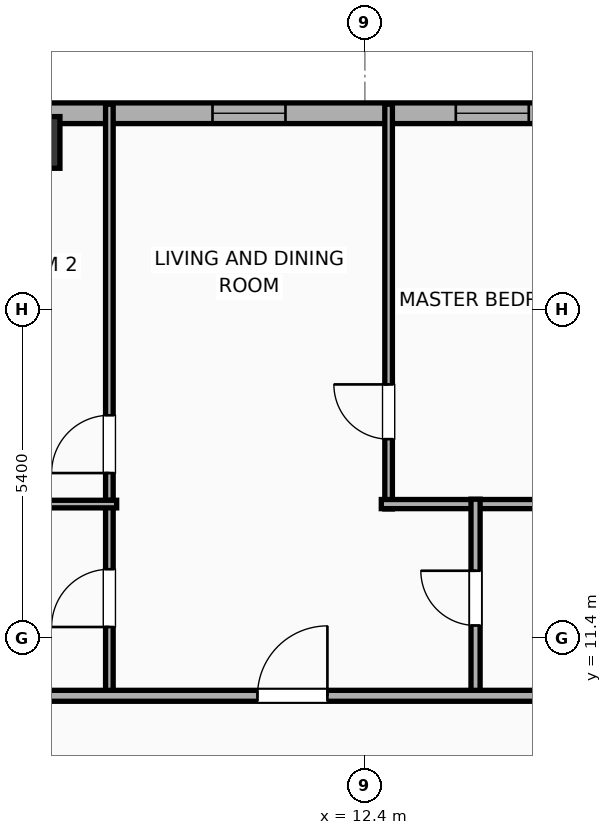
"""IFC4 building model, lengths in metres.
Left out: names, types, materials, properties, quantities, classifications, styles, units other than length and angle.
Written with IfcOpenShell. Run it as: python <this file> out.ifc"""

import sys

from ifc_helpers import new_model, si_unit, direction, frame, frame_2d, origin, origin_2d, place, context, subcontext, project, spatial, rectangle, hollow_rectangle, extrude, element, fill, save


model = new_model("IFC4")
c1 = context("Model", 3, precision=1e-05, world=origin(), true_north=direction((0.0, 1.0)))
c2 = subcontext(c1, "Body", "Model", "MODEL_VIEW")
j1 = project(units=[si_unit("LENGTHUNIT", "METRE"), si_unit("PLANEANGLEUNIT", "RADIAN")], contexts=[c1])
p1 = place(None, origin())
s1 = spatial("IfcSite", under=j1, at=p1, CompositionType="ELEMENT")
p2 = place(p1, origin())
s2 = spatial("IfcBuilding", under=s1, at=p2, CompositionType="ELEMENT")
p3 = place(p2, frame((0.0, 0.0, 204.1)))
s3 = spatial("IfcBuildingStorey", under=s2, at=p3, CompositionType="ELEMENT", Elevation=204.1)
p4 = place(p3, frame((6.96, 19.55, 0.0), z_axis=(0.0, 0.0, 1.0), x_axis=(1.0, 0.0, 0.0)))
e1 = element("IfcColumn", 1, at=p4, inside=s3, PredefinedType="COLUMN", context=c2, shape_type="SweptSolid", body=[
    extrude(hollow_rectangle(XDim=0.85, YDim=0.85, WallThickness=0.028, at=origin_2d()), origin(), (0.0, 0.0, 1.0), 3.9),
])
p5 = place(p3, frame((-22.783, 20.03, 0.0), z_axis=(0.0, 0.0, 1.0), x_axis=(1.0, 0.0, 0.0)))
e2 = element("IfcWall", 2, at=p5, inside=s3, PredefinedType="ELEMENTEDWALL", context=c2, shape_type="SweptSolid", body=[
    extrude(rectangle(XDim=49.566, YDim=0.34, at=frame_2d((24.783, 0.0))), origin(), (0.0, 0.0, 1.0), 3.65),
])
p6 = place(p5, frame((6.211, 0.0, 0.75)))
e3 = element("IfcOpeningElement", 3, at=p6, cuts=e2, PredefinedType="OPENING", context=c2, shape_type="SweptSolid", body=[
    extrude(rectangle(XDim=2.4, YDim=2.1, at=frame_2d((1.2, 1.05))), frame((0.0, 0.18, 0.0), z_axis=(0.0, -1.0, 0.0), x_axis=(1.0, 0.0, 0.0)), (0.0, 0.0, 1.0), 0.36),
])
p7 = place(p5, frame((22.733, 0.0, 0.75)))
e4 = element("IfcOpeningElement", 4, at=p7, cuts=e2, PredefinedType="OPENING", context=c2, shape_type="SweptSolid", body=[
    extrude(rectangle(XDim=2.4, YDim=2.1, at=frame_2d((1.2, 1.05))), frame((0.0, 0.18, 0.0), z_axis=(0.0, -1.0, 0.0), x_axis=(1.0, 0.0, 0.0)), (0.0, 0.0, 1.0), 0.36),
])
p8 = place(p5, frame((1.132, 0.0, 0.75)))
e5 = element("IfcOpeningElement", 5, at=p8, cuts=e2, PredefinedType="OPENING", context=c2, shape_type="SweptSolid", body=[
    extrude(rectangle(XDim=1.2, YDim=2.05, at=frame_2d((0.6, 1.025))), frame((0.0, 0.18, 0.0), z_axis=(0.0, -1.0, 0.0), x_axis=(1.0, 0.0, 0.0)), (0.0, 0.0, 1.0), 0.36),
])
p9 = place(p5, frame((3.678, 0.0, 0.75)))
e6 = element("IfcOpeningElement", 6, at=p9, cuts=e2, PredefinedType="OPENING", context=c2, shape_type="SweptSolid", body=[
    extrude(rectangle(XDim=1.2, YDim=2.05, at=frame_2d((0.6, 1.025))), frame((0.0, 0.18, 0.0), z_axis=(0.0, -1.0, 0.0), x_axis=(1.0, 0.0, 0.0)), (0.0, 0.0, 1.0), 0.36),
])
p10 = place(p5, frame((14.804, 0.0, 0.75)))
e7 = element("IfcOpeningElement", 7, at=p10, cuts=e2, PredefinedType="OPENING", context=c2, shape_type="SweptSolid", body=[
    extrude(rectangle(XDim=1.2, YDim=2.05, at=frame_2d((0.6, 1.025))), frame((0.0, 0.18, 0.0), z_axis=(0.0, -1.0, 0.0), x_axis=(1.0, 0.0, 0.0)), (0.0, 0.0, 1.0), 0.36),
])
p11 = place(p5, frame((12.054, 0.0, 0.75)))
e8 = element("IfcOpeningElement", 8, at=p11, cuts=e2, PredefinedType="OPENING", context=c2, shape_type="SweptSolid", body=[
    extrude(rectangle(XDim=1.2, YDim=2.05, at=frame_2d((0.6, 1.025))), frame((0.0, 0.18, 0.0), z_axis=(0.0, -1.0, 0.0), x_axis=(1.0, 0.0, 0.0)), (0.0, 0.0, 1.0), 0.36),
])
p12 = place(p5, frame((17.933, 0.0, 0.75)))
e9 = element("IfcOpeningElement", 9, at=p12, cuts=e2, PredefinedType="OPENING", context=c2, shape_type="SweptSolid", body=[
    extrude(rectangle(XDim=1.2, YDim=2.05, at=frame_2d((0.6, 1.025))), frame((0.0, 0.18, 0.0), z_axis=(0.0, -1.0, 0.0), x_axis=(1.0, 0.0, 0.0)), (0.0, 0.0, 1.0), 0.36),
])
p13 = place(p5, frame((26.278, 0.0, 0.75)))
e10 = element("IfcOpeningElement", 10, at=p13, cuts=e2, PredefinedType="OPENING", context=c2, shape_type="SweptSolid", body=[
    extrude(rectangle(XDim=1.2, YDim=2.05, at=frame_2d((0.6, 1.025))), frame((0.0, 0.18, 0.0), z_axis=(0.0, -1.0, 0.0), x_axis=(1.0, 0.0, 0.0)), (0.0, 0.0, 1.0), 0.36),
])
p14 = place(p5, frame((32.677, 0.0, 0.75)))
e11 = element("IfcOpeningElement", 11, at=p14, cuts=e2, PredefinedType="OPENING", context=c2, shape_type="SweptSolid", body=[
    extrude(rectangle(XDim=1.2, YDim=2.05, at=frame_2d((0.6, 1.025))), frame((0.0, 0.18, 0.0), z_axis=(0.0, -1.0, 0.0), x_axis=(1.0, 0.0, 0.0)), (0.0, 0.0, 1.0), 0.36),
])
p15 = place(p5, frame((28.217, 0.0, 0.75)))
e12 = element("IfcOpeningElement", 12, at=p15, cuts=e2, PredefinedType="OPENING", context=c2, shape_type="SweptSolid", body=[
    extrude(rectangle(XDim=0.85, YDim=2.05, at=frame_2d((0.425, 1.025))), frame((0.0, 0.18, 0.0), z_axis=(0.0, -1.0, 0.0), x_axis=(1.0, 0.0, 0.0)), (0.0, 0.0, 1.0), 0.36),
])
p16 = place(p5, frame((36.678, 0.0, 0.75)))
e13 = element("IfcOpeningElement", 13, at=p16, cuts=e2, PredefinedType="OPENING", context=c2, shape_type="SweptSolid", body=[
    extrude(rectangle(XDim=1.2, YDim=2.05, at=frame_2d((0.6, 1.025))), frame((0.0, 0.18, 0.0), z_axis=(0.0, -1.0, 0.0), x_axis=(1.0, 0.0, 0.0)), (0.0, 0.0, 1.0), 0.36),
])
p17 = place(p5, frame((40.307, 0.0, 0.75)))
e14 = element("IfcOpeningElement", 14, at=p17, cuts=e2, PredefinedType="OPENING", context=c2, shape_type="SweptSolid", body=[
    extrude(rectangle(XDim=1.2, YDim=2.05, at=frame_2d((0.6, 1.025))), frame((0.0, 0.18, 0.0), z_axis=(0.0, -1.0, 0.0), x_axis=(1.0, 0.0, 0.0)), (0.0, 0.0, 1.0), 0.36),
])
p18 = place(p5, frame((43.696, 0.0, 0.75)))
e15 = element("IfcOpeningElement", 15, at=p18, cuts=e2, PredefinedType="OPENING", context=c2, shape_type="SweptSolid", body=[
    extrude(rectangle(XDim=1.2, YDim=2.05, at=frame_2d((0.6, 1.025))), frame((0.0, 0.18, 0.0), z_axis=(0.0, -1.0, 0.0), x_axis=(1.0, 0.0, 0.0)), (0.0, 0.0, 1.0), 0.36),
])
p19 = place(p5, frame((46.739, 0.0, 0.75)))
e16 = element("IfcOpeningElement", 16, at=p19, cuts=e2, PredefinedType="OPENING", context=c2, shape_type="SweptSolid", body=[
    extrude(rectangle(XDim=1.2, YDim=2.05, at=frame_2d((0.6, 1.025))), frame((0.0, 0.18, 0.0), z_axis=(0.0, -1.0, 0.0), x_axis=(1.0, 0.0, 0.0)), (0.0, 0.0, 1.0), 0.36),
])
p20 = place(p3, frame((8.198, 13.541, 0.0), z_axis=(0.0, 0.0, 1.0), x_axis=(0.0, 1.0, 0.0)))
e17 = element("IfcWall", 17, at=p20, inside=s3, PredefinedType="PARTITIONING", context=c2, shape_type="SweptSolid", body=[
    extrude(rectangle(XDim=6.639, YDim=0.125, at=frame_2d((3.32, 0.0))), origin(), (0.0, 0.0, 1.0), 3.65),
])
p21 = place(p20, frame((0.573, 0.0, 0.0)))
e18 = element("IfcOpeningElement", 18, at=p21, cuts=e17, PredefinedType="OPENING", context=c2, shape_type="SweptSolid", body=[
    extrude(rectangle(XDim=0.95, YDim=2.05, at=frame_2d((0.475, 1.025))), frame((0.0, 0.073, 0.0), z_axis=(0.0, -1.0, 0.0), x_axis=(1.0, 0.0, 0.0)), (0.0, 0.0, 1.0), 0.145),
])
p22 = place(p3, frame((12.79, 13.523, 0.0), z_axis=(0.0, 0.0, 1.0), x_axis=(0.0, 1.0, 0.0)))
e19 = element("IfcWall", 19, at=p22, inside=s3, PredefinedType="PARTITIONING", context=c2, shape_type="SweptSolid", body=[
    extrude(rectangle(XDim=6.657, YDim=0.125, at=frame_2d((3.329, 0.0))), origin(), (0.0, 0.0, 1.0), 3.65),
])
p23 = place(p22, frame((1.148, 0.0, 0.0)))
e20 = element("IfcOpeningElement", 20, at=p23, cuts=e19, PredefinedType="OPENING", context=c2, shape_type="SweptSolid", body=[
    extrude(rectangle(XDim=0.9, YDim=2.05, at=frame_2d((0.45, 1.025))), frame((0.0, 0.073, 0.0), z_axis=(0.0, -1.0, 0.0), x_axis=(1.0, 0.0, 0.0)), (0.0, 0.0, 1.0), 0.145),
])
p24 = place(p3, frame((12.67, 13.603, 0.0), z_axis=(0.0, 0.0, 1.0), x_axis=(1.0, 0.0, 0.0)))
e21 = element("IfcWall", 21, at=p24, inside=s3, PredefinedType="PLUMBINGWALL", context=c2, shape_type="SweptSolid", body=[
    extrude(rectangle(XDim=3.79, YDim=0.15, at=frame_2d((1.895, 0.0))), origin(), (0.0, 0.0, 1.0), 3.65),
])
p25 = place(p3, frame((8.198, 10.43, 0.0), z_axis=(0.0, 0.0, 1.0), x_axis=(0.0, 1.0, 0.0)))
e22 = element("IfcWall", 22, at=p25, inside=s3, PredefinedType="PARTITIONING", context=c2, shape_type="SweptSolid", body=[
    extrude(rectangle(XDim=3.236, YDim=0.125, at=frame_2d((1.618, 0.0))), origin(), (0.0, 0.0, 1.0), 3.65),
])
p26 = place(p25, frame((1.152, 0.0, 0.0)))
e23 = element("IfcOpeningElement", 23, at=p26, cuts=e22, PredefinedType="OPENING", context=c2, shape_type="SweptSolid", body=[
    extrude(rectangle(XDim=0.95, YDim=2.05, at=frame_2d((0.475, 1.025))), frame((0.0, 0.073, 0.0), z_axis=(0.0, -1.0, 0.0), x_axis=(1.0, 0.0, 0.0)), (0.0, 0.0, 1.0), 0.145),
])
p27 = place(p3, frame((4.94, 13.603, 0.0), z_axis=(0.0, 0.0, 1.0), x_axis=(1.0, 0.0, 0.0)))
e24 = element("IfcWall", 24, at=p27, inside=s3, PredefinedType="PARTITIONING", context=c2, shape_type="SweptSolid", body=[
    extrude(rectangle(XDim=3.378, YDim=0.125, at=frame_2d((1.689, 0.0))), origin(), (0.0, 0.0, 1.0), 3.65),
])
p28 = place(p3, frame((14.22, 10.43, 0.0), z_axis=(0.0, 0.0, 1.0), x_axis=(0.0, 1.0, 0.0)))
e25 = element("IfcWall", 25, at=p28, inside=s3, PredefinedType="PLUMBINGWALL", context=c2, shape_type="SweptSolid", body=[
    extrude(rectangle(XDim=3.253, YDim=0.15, at=frame_2d((1.626, 0.0))), origin(), (0.0, 0.0, 1.0), 3.65),
])
p29 = place(p28, frame((1.177, 0.0, 0.0)))
e26 = element("IfcOpeningElement", 26, at=p29, cuts=e25, PredefinedType="OPENING", context=c2, shape_type="SweptSolid", body=[
    extrude(rectangle(XDim=0.9, YDim=2.05, at=frame_2d((0.45, 1.025))), frame((0.0, 0.085, 0.0), z_axis=(0.0, -1.0, 0.0), x_axis=(1.0, 0.0, 0.0)), (0.0, 0.0, 1.0), 0.17),
])
p30 = place(p3, frame((-26.23, 10.45, 0.0), z_axis=(0.0, 0.0, 1.0), x_axis=(1.0, 0.0, 0.0)))
e27 = element("IfcWall", 27, at=p30, inside=s3, PredefinedType="PARTITIONING", context=c2, shape_type="SweptSolid", body=[
    extrude(rectangle(XDim=56.46, YDim=0.18, at=frame_2d((28.23, 0.0))), origin(), (0.0, 0.0, 1.0), 3.65),
])
p31 = place(p30, frame((4.41, 0.0, 0.0)))
e28 = element("IfcOpeningElement", 28, at=p31, cuts=e27, PredefinedType="OPENING", context=c2, shape_type="SweptSolid", body=[
    extrude(rectangle(XDim=1.15, YDim=2.05, at=frame_2d((0.575, 1.025))), frame((0.0, 0.1, 0.0), z_axis=(0.0, -1.0, 0.0), x_axis=(1.0, 0.0, 0.0)), (0.0, 0.0, 1.0), 0.2),
])
p32 = place(p30, frame((11.943, 0.0, 0.0)))
e29 = element("IfcOpeningElement", 29, at=p32, cuts=e27, PredefinedType="OPENING", context=c2, shape_type="SweptSolid", body=[
    extrude(rectangle(XDim=0.9, YDim=2.05, at=frame_2d((0.45, 1.025))), frame((0.0, 0.1, 0.0), z_axis=(0.0, -1.0, 0.0), x_axis=(1.0, 0.0, 0.0)), (0.0, 0.0, 1.0), 0.2),
])
p33 = place(p30, frame((18.243, 0.0, 0.0)))
e30 = element("IfcOpeningElement", 30, at=p33, cuts=e27, PredefinedType="OPENING", context=c2, shape_type="SweptSolid", body=[
    extrude(rectangle(XDim=1.15, YDim=2.05, at=frame_2d((0.575, 1.025))), frame((0.0, 0.1, 0.0), z_axis=(0.0, -1.0, 0.0), x_axis=(1.0, 0.0, 0.0)), (0.0, 0.0, 1.0), 0.2),
])
p34 = place(p30, frame((22.941, 0.0, 0.0)))
e31 = element("IfcOpeningElement", 31, at=p34, cuts=e27, PredefinedType="OPENING", context=c2, shape_type="SweptSolid", body=[
    extrude(rectangle(XDim=0.9, YDim=2.05, at=frame_2d((0.45, 1.025))), frame((0.0, 0.1, 0.0), z_axis=(0.0, -1.0, 0.0), x_axis=(1.0, 0.0, 0.0)), (0.0, 0.0, 1.0), 0.2),
])
p35 = place(p30, frame((27.028, 0.0, 0.0)))
e32 = element("IfcOpeningElement", 32, at=p35, cuts=e27, PredefinedType="OPENING", context=c2, shape_type="SweptSolid", body=[
    extrude(rectangle(XDim=1.15, YDim=2.05, at=frame_2d((0.575, 1.025))), frame((0.0, 0.1, 0.0), z_axis=(0.0, -1.0, 0.0), x_axis=(1.0, 0.0, 0.0)), (0.0, 0.0, 1.0), 0.2),
])
p36 = place(p30, frame((36.864, 0.0, 0.0)))
e33 = element("IfcOpeningElement", 33, at=p36, cuts=e27, PredefinedType="OPENING", context=c2, shape_type="SweptSolid", body=[
    extrude(rectangle(XDim=1.15, YDim=2.05, at=frame_2d((0.575, 1.025))), frame((0.0, 0.1, 0.0), z_axis=(0.0, -1.0, 0.0), x_axis=(1.0, 0.0, 0.0)), (0.0, 0.0, 1.0), 0.2),
])
p37 = place(p30, frame((45.655, 0.0, 0.0)))
e34 = element("IfcOpeningElement", 34, at=p37, cuts=e27, PredefinedType="OPENING", context=c2, shape_type="SweptSolid", body=[
    extrude(rectangle(XDim=0.9, YDim=2.05, at=frame_2d((0.45, 1.025))), frame((0.0, 0.1, 0.0), z_axis=(0.0, -1.0, 0.0), x_axis=(1.0, 0.0, 0.0)), (0.0, 0.0, 1.0), 0.2),
])
p38 = place(p30, frame((52.576, 0.0, 0.0)))
e35 = element("IfcOpeningElement", 35, at=p38, cuts=e27, PredefinedType="OPENING", context=c2, shape_type="SweptSolid", body=[
    extrude(rectangle(XDim=1.15, YDim=2.05, at=frame_2d((0.575, 1.025))), frame((0.0, 0.1, 0.0), z_axis=(0.0, -1.0, 0.0), x_axis=(1.0, 0.0, 0.0)), (0.0, 0.0, 1.0), 0.2),
])
p39 = place(p14, origin())
e36 = element("IfcWindow", 36, at=p39, inside=s3, PartitioningType="SINGLE_PANEL", PredefinedType="WINDOW", context=c2, shape_type="SweptSolid", body=[
    extrude(rectangle(XDim=1.2, YDim=2.05, at=frame_2d((0.6, 1.025))), frame((0.0, 0.03, 0.0), z_axis=(0.0, -1.0, 0.0), x_axis=(1.0, 0.0, 0.0)), (0.0, 0.0, 1.0), 0.06),
])
fill(e11, e36)
p40 = place(p16, origin())
e37 = element("IfcWindow", 37, at=p40, inside=s3, PartitioningType="SINGLE_PANEL", PredefinedType="WINDOW", context=c2, shape_type="SweptSolid", body=[
    extrude(rectangle(XDim=1.2, YDim=2.05, at=frame_2d((0.6, 1.025))), frame((0.0, 0.03, 0.0), z_axis=(0.0, -1.0, 0.0), x_axis=(1.0, 0.0, 0.0)), (0.0, 0.0, 1.0), 0.06),
])
fill(e13, e37)
p41 = place(p21, origin())
e38 = element("IfcDoor", 38, at=p41, inside=s3, OperationType="SINGLE_SWING_LEFT", PredefinedType="DOOR", context=c2, shape_type="SweptSolid", body=[
    extrude(rectangle(XDim=0.95, YDim=2.05, at=frame_2d((0.475, 1.025))), frame((0.0, 0.025, 0.0), z_axis=(0.0, -1.0, 0.0), x_axis=(1.0, 0.0, 0.0)), (0.0, 0.0, 1.0), 0.05),
])
fill(e18, e38)
p42 = place(p23, origin())
e39 = element("IfcDoor", 39, at=p42, inside=s3, OperationType="SINGLE_SWING_RIGHT", PredefinedType="DOOR", context=c2, shape_type="SweptSolid", body=[
    extrude(rectangle(XDim=0.9, YDim=2.05, at=frame_2d((0.45, 1.025))), frame((0.0, 0.025, 0.0), z_axis=(0.0, -1.0, 0.0), x_axis=(1.0, 0.0, 0.0)), (0.0, 0.0, 1.0), 0.05),
])
fill(e20, e39)
p43 = place(p26, origin())
e40 = element("IfcDoor", 40, at=p43, inside=s3, OperationType="SINGLE_SWING_LEFT", PredefinedType="DOOR", context=c2, shape_type="SweptSolid", body=[
    extrude(rectangle(XDim=0.95, YDim=2.05, at=frame_2d((0.475, 1.025))), frame((0.0, 0.025, 0.0), z_axis=(0.0, -1.0, 0.0), x_axis=(1.0, 0.0, 0.0)), (0.0, 0.0, 1.0), 0.05),
])
fill(e23, e40)
p44 = place(p29, origin())
e41 = element("IfcDoor", 41, at=p44, inside=s3, OperationType="SINGLE_SWING_RIGHT", PredefinedType="DOOR", context=c2, shape_type="SweptSolid", body=[
    extrude(rectangle(XDim=0.9, YDim=2.05, at=frame_2d((0.45, 1.025))), frame((0.0, 0.025, 0.0), z_axis=(0.0, -1.0, 0.0), x_axis=(1.0, 0.0, 0.0)), (0.0, 0.0, 1.0), 0.05),
])
fill(e26, e41)
p45 = place(p36, origin())
e42 = element("IfcDoor", 42, at=p45, inside=s3, OperationType="SINGLE_SWING_RIGHT", PredefinedType="DOOR", context=c2, shape_type="SweptSolid", body=[
    extrude(rectangle(XDim=1.15, YDim=2.05, at=frame_2d((0.575, 1.025))), frame((0.0, 0.025, 0.0), z_axis=(0.0, -1.0, 0.0), x_axis=(1.0, 0.0, 0.0)), (0.0, 0.0, 1.0), 0.05),
])
fill(e33, e42)
save(model, sys.argv[1])
